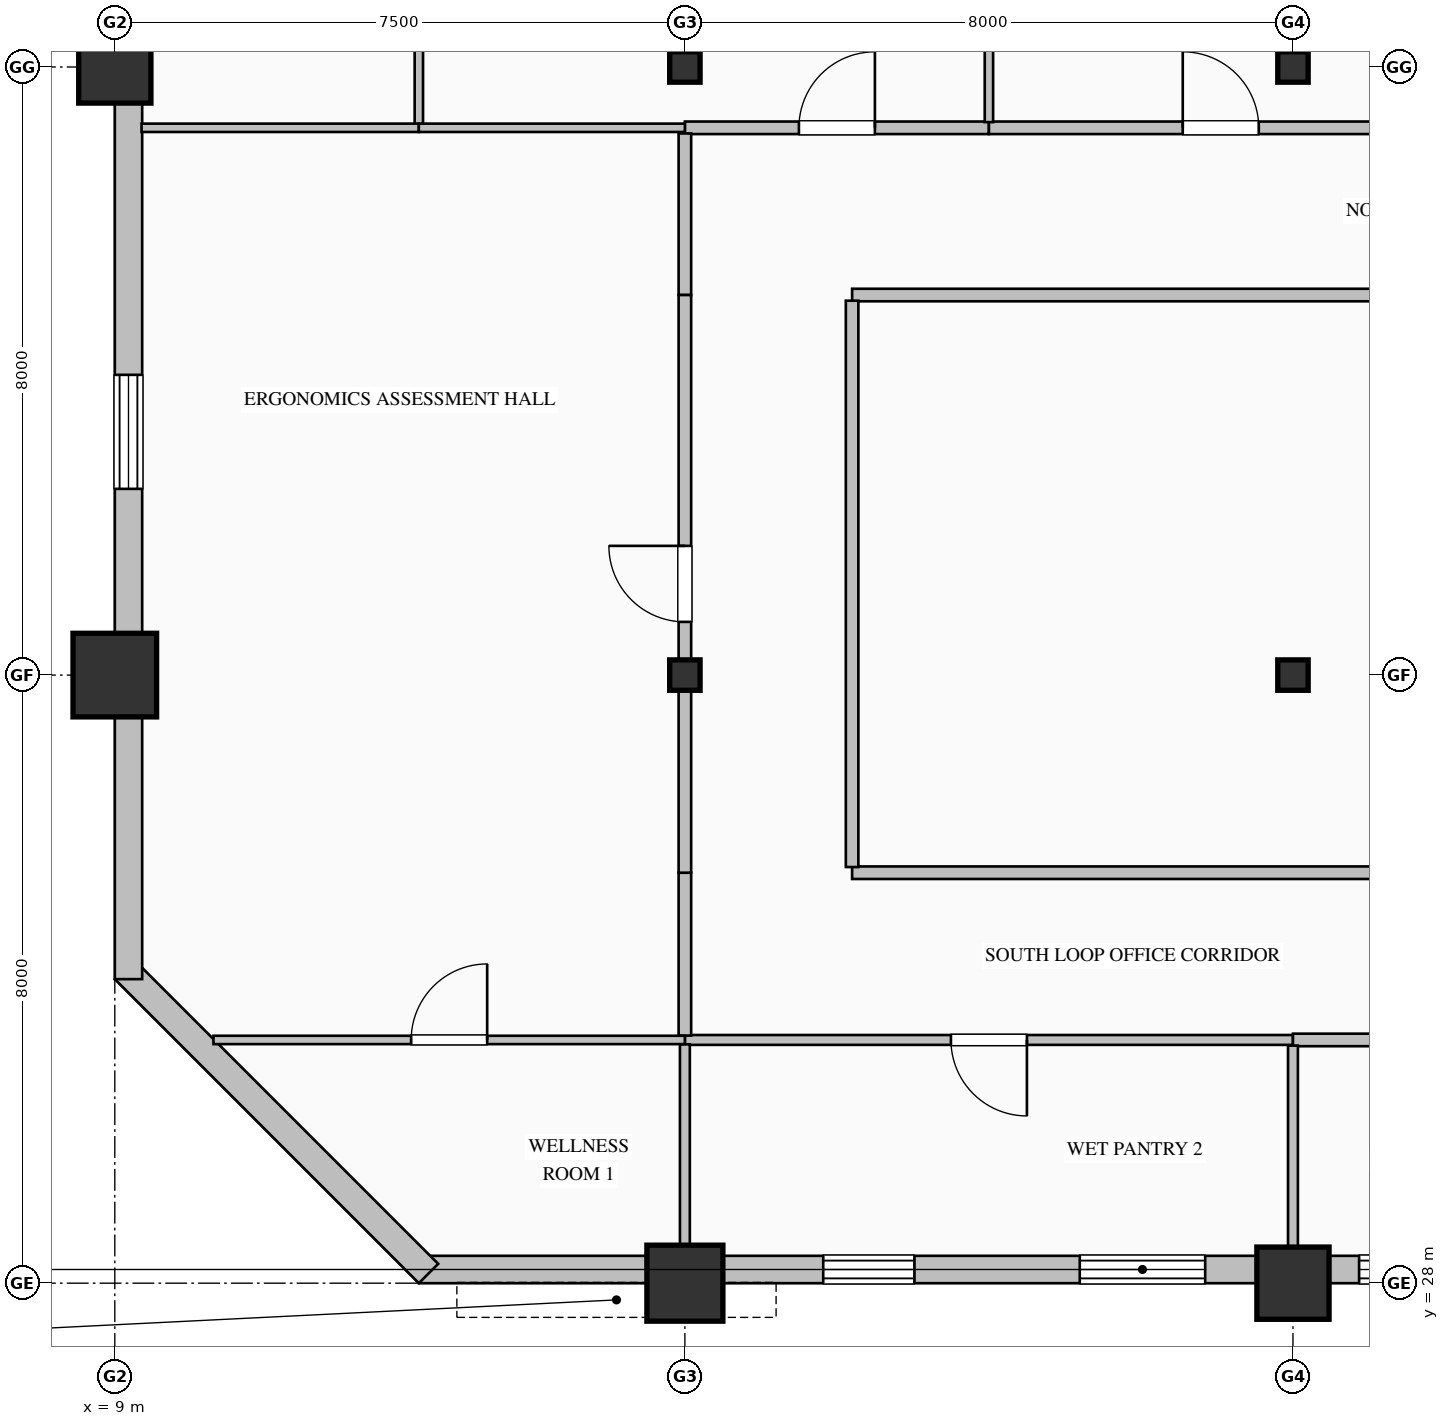
"""IFC4 building model, lengths in metres.
Left out: names, types, materials, properties, quantities, classifications, styles, units other than length and angle.
Written with IfcOpenShell. Run it as: python <this file> out.ifc"""

import sys

from ifc_helpers import new_model, si_unit, direction, frame, frame_2d, origin, origin_2d, place, context, subcontext, project, spatial, rectangle, hollow_rectangle, hollow_circle, i_section, extrude, element, fill, save


model = new_model("IFC4")
c1 = context("Model", 3, precision=1e-05, world=origin(), true_north=direction((0.0, 1.0)))
c2 = subcontext(c1, "Body", "Model", "MODEL_VIEW")
j1 = project(units=[si_unit("LENGTHUNIT", "METRE"), si_unit("PLANEANGLEUNIT", "RADIAN")], contexts=[c1])
p1 = place(None, origin())
s1 = spatial("IfcSite", under=j1, at=p1, CompositionType="ELEMENT")
p2 = place(p1, origin())
s2 = spatial("IfcBuilding", under=s1, at=p2, CompositionType="ELEMENT")
p3 = place(p2, frame((0.0, 0.0, 171.0)))
s3 = spatial("IfcBuildingStorey", under=s2, at=p3, CompositionType="ELEMENT", Elevation=171.0)
p4 = place(p3, frame((9.0, 36.0, 0.0), z_axis=(0.0, 0.0, 1.0), x_axis=(1.0, 0.0, 0.0)))
e1 = element("IfcColumn", 1, at=p4, inside=s3, PredefinedType="COLUMN", context=c2, shape_type="SweptSolid", body=[
    extrude(hollow_rectangle(XDim=1.1, YDim=1.1, WallThickness=0.04, at=origin_2d()), origin(), (0.0, 0.0, 1.0), 4.0),
])
p5 = place(p3, frame((9.0, 44.0, 0.0), z_axis=(0.0, 0.0, 1.0), x_axis=(1.0, 0.0, 0.0)))
e2 = element("IfcColumn", 2, at=p5, inside=s3, PredefinedType="COLUMN", context=c2, shape_type="SweptSolid", body=[
    extrude(hollow_rectangle(XDim=0.95, YDim=0.95, WallThickness=0.036, at=origin_2d()), origin(), (0.0, 0.0, 1.0), 4.0),
])
p6 = place(p3, frame((16.5, 28.0, 0.0), z_axis=(0.0, 0.0, 1.0), x_axis=(1.0, 0.0, 0.0)))
e3 = element("IfcColumn", 3, at=p6, inside=s3, PredefinedType="COLUMN", context=c2, shape_type="SweptSolid", body=[
    extrude(hollow_circle(Radius=0.5, WallThickness=0.036, at=origin_2d()), origin(), (0.0, 0.0, 1.0), 4.0),
])
for number, where, z_axis, x_axis in (
    (4, (16.5, 36.0, 0.0), (0.0, 0.0, 1.0), (1.0, 0.0, 0.0)),
    (5, (16.5, 44.0, 0.0), (0.0, 0.0, 1.0), (1.0, 0.0, 0.0)),
):
    element("IfcColumn", number, at=place(p3, frame(where, z_axis=z_axis, x_axis=x_axis)), inside=s3, PredefinedType="COLUMN", context=c2, shape_type="SweptSolid", body=[
        extrude(i_section(OverallWidth=0.4, OverallDepth=0.4, WebThickness=0.013, FlangeThickness=0.021, FilletRadius=0.022, at=origin_2d()), origin(), (0.0, 0.0, 1.0), 4.0),
    ])
p7 = place(p3, frame((24.5, 28.0, 0.0), z_axis=(0.0, 0.0, 1.0), x_axis=(1.0, 0.0, 0.0)))
e6 = element("IfcColumn", 6, at=p7, inside=s3, PredefinedType="COLUMN", context=c2, shape_type="SweptSolid", body=[
    extrude(hollow_rectangle(XDim=0.95, YDim=0.95, WallThickness=0.036, at=origin_2d()), origin(), (0.0, 0.0, 1.0), 4.0),
])
for number, where, z_axis, x_axis in (
    (7, (24.5, 36.0, 0.0), (0.0, 0.0, 1.0), (1.0, 0.0, 0.0)),
    (8, (24.5, 44.0, 0.0), (0.0, 0.0, 1.0), (1.0, 0.0, 0.0)),
):
    element("IfcColumn", number, at=place(p3, frame(where, z_axis=z_axis, x_axis=x_axis)), inside=s3, PredefinedType="COLUMN", context=c2, shape_type="SweptSolid", body=[
        extrude(i_section(OverallWidth=0.4, OverallDepth=0.4, WebThickness=0.013, FlangeThickness=0.021, FilletRadius=0.022, at=origin_2d()), origin(), (0.0, 0.0, 1.0), 4.0),
    ])
p8 = place(p3, frame((40.52, 28.18, 0.0), z_axis=(0.0, 0.0, 1.0), x_axis=(-1.0, 0.0, 0.0)))
e9 = element("IfcWall", 9, at=p8, inside=s3, PredefinedType="SOLIDWALL", context=c2, shape_type="SweptSolid", body=[
    extrude(rectangle(XDim=27.52, YDim=0.36, at=frame_2d((13.76, 0.0))), origin(), (0.0, 0.0, 1.0), 3.165),
])
p9 = place(p8, frame((10.2, 0.0, 0.7)))
e10 = element("IfcOpeningElement", 10, at=p9, cuts=e9, PredefinedType="OPENING", context=c2, shape_type="SweptSolid", body=[
    extrude(rectangle(XDim=1.2, YDim=1.85, at=frame_2d((0.6, 0.925))), frame((0.0, 0.19, 0.0), z_axis=(0.0, -1.0, 0.0), x_axis=(1.0, 0.0, 0.0)), (0.0, 0.0, 1.0), 0.38),
])
p10 = place(p8, frame((13.65, 0.0, 0.85)))
e11 = element("IfcOpeningElement", 11, at=p10, cuts=e9, PredefinedType="OPENING", context=c2, shape_type="SweptSolid", body=[
    extrude(rectangle(XDim=1.5, YDim=1.95, at=frame_2d((0.75, 0.975))), frame((0.0, 0.19, 0.0), z_axis=(0.0, -1.0, 0.0), x_axis=(1.0, 0.0, 0.0)), (0.0, 0.0, 1.0), 0.38),
])
p11 = place(p8, frame((17.175, 0.0, 0.85)))
e12 = element("IfcOpeningElement", 12, at=p11, cuts=e9, PredefinedType="OPENING", context=c2, shape_type="SweptSolid", body=[
    extrude(rectangle(XDim=1.65, YDim=1.95, at=frame_2d((0.825, 0.975))), frame((0.0, 0.19, 0.0), z_axis=(0.0, -1.0, 0.0), x_axis=(1.0, 0.0, 0.0)), (0.0, 0.0, 1.0), 0.38),
])
p12 = place(p8, frame((21.0, 0.0, 0.7)))
e13 = element("IfcOpeningElement", 13, at=p12, cuts=e9, PredefinedType="OPENING", context=c2, shape_type="SweptSolid", body=[
    extrude(rectangle(XDim=1.2, YDim=1.85, at=frame_2d((0.6, 0.925))), frame((0.0, 0.19, 0.0), z_axis=(0.0, -1.0, 0.0), x_axis=(1.0, 0.0, 0.0)), (0.0, 0.0, 1.0), 0.38),
])
p13 = place(p3, frame((13.127, 28.127, 0.0), z_axis=(0.0, 0.0, 1.0), x_axis=(-0.707106781187, 0.707106781187, 0.0)))
e14 = element("IfcWall", 14, at=p13, inside=s3, PredefinedType="SOLIDWALL", context=c2, shape_type="SweptSolid", body=[
    extrude(rectangle(XDim=5.657, YDim=0.36, at=frame_2d((2.828, 0.0))), origin(), (0.0, 0.0, 1.0), 3.765),
])
p14 = place(p3, frame((9.18, 32.0, 0.0), z_axis=(0.0, 0.0, 1.0), x_axis=(0.0, 1.0, 0.0)))
e15 = element("IfcWall", 15, at=p14, inside=s3, PredefinedType="SOLIDWALL", context=c2, shape_type="SweptSolid", body=[
    extrude(rectangle(XDim=16.0, YDim=0.36, at=frame_2d((8.0, 0.0))), origin(), (0.0, 0.0, 1.0), 3.265),
])
p15 = place(p14, frame((6.45, 0.0, 0.85)))
e16 = element("IfcOpeningElement", 16, at=p15, cuts=e15, PredefinedType="OPENING", context=c2, shape_type="SweptSolid", body=[
    extrude(rectangle(XDim=1.5, YDim=1.95, at=frame_2d((0.75, 0.975))), frame((0.0, 0.19, 0.0), z_axis=(0.0, -1.0, 0.0), x_axis=(1.0, 0.0, 0.0)), (0.0, 0.0, 1.0), 0.38),
])
p16 = place(p3, frame((18.7, 33.4, 0.0), z_axis=(0.0, 0.0, 1.0), x_axis=(1.0, 0.0, 0.0)))
e17 = element("IfcWall", 17, at=p16, inside=s3, PredefinedType="PARTITIONING", context=c2, shape_type="SweptSolid", body=[
    extrude(rectangle(XDim=19.1, YDim=0.165, at=frame_2d((9.55, 0.0))), origin(), (0.0, 0.0, 1.0), 3.765),
])
p17 = place(p16, frame((9.05, 0.0, 0.0)))
e18 = element("IfcOpeningElement", 18, at=p17, cuts=e17, PredefinedType="OPENING", context=c2, shape_type="SweptSolid", body=[
    extrude(rectangle(XDim=1.0, YDim=2.15, at=frame_2d((0.5, 1.075))), frame((0.0, 0.093, 0.0), z_axis=(0.0, -1.0, 0.0), x_axis=(1.0, 0.0, 0.0)), (0.0, 0.0, 1.0), 0.185),
])
p18 = place(p3, frame((24.5, 31.2, 0.0), z_axis=(0.0, 0.0, 1.0), x_axis=(-1.0, 0.0, 0.0)))
e19 = element("IfcWall", 19, at=p18, inside=s3, PredefinedType="PARTITIONING", context=c2, shape_type="SweptSolid", body=[
    extrude(rectangle(XDim=8.0, YDim=0.13, at=frame_2d((4.0, 0.0))), origin(), (0.0, 0.0, 1.0), 3.765),
])
p19 = place(p18, frame((3.5, 0.0, 0.0)))
e20 = element("IfcOpeningElement", 20, at=p19, cuts=e19, PredefinedType="OPENING", context=c2, shape_type="SweptSolid", body=[
    extrude(rectangle(XDim=1.0, YDim=2.15, at=frame_2d((0.5, 1.075))), frame((0.0, 0.075, 0.0), z_axis=(0.0, -1.0, 0.0), x_axis=(1.0, 0.0, 0.0)), (0.0, 0.0, 1.0), 0.15),
])
p20 = place(p3, frame((32.5, 31.2, 0.0), z_axis=(0.0, 0.0, 1.0), x_axis=(-1.0, 0.0, 0.0)))
e21 = element("IfcWall", 21, at=p20, inside=s3, PredefinedType="PARTITIONING", context=c2, shape_type="SweptSolid", body=[
    extrude(rectangle(XDim=8.0, YDim=0.165, at=frame_2d((4.0, 0.0))), origin(), (0.0, 0.0, 1.0), 3.765),
])
p21 = place(p20, frame((3.5, 0.0, 0.0)))
e22 = element("IfcOpeningElement", 22, at=p21, cuts=e21, PredefinedType="OPENING", context=c2, shape_type="SweptSolid", body=[
    extrude(rectangle(XDim=1.0, YDim=2.15, at=frame_2d((0.5, 1.075))), frame((0.0, 0.093, 0.0), z_axis=(0.0, -1.0, 0.0), x_axis=(1.0, 0.0, 0.0)), (0.0, 0.0, 1.0), 0.185),
])
p22 = place(p3, frame((16.5, 31.257, 0.0), z_axis=(0.0, 0.0, 1.0), x_axis=(0.0, 1.0, 0.0)))
e23 = element("IfcWall", 23, at=p22, inside=s3, PredefinedType="PARTITIONING", context=c2, shape_type="SweptSolid", body=[
    extrude(rectangle(XDim=2.143, YDim=0.165, at=frame_2d((1.071, 0.0))), origin(), (0.0, 0.0, 1.0), 3.157),
])
p23 = place(p3, frame((16.5, 43.2, 0.0), z_axis=(0.0, 0.0, 1.0), x_axis=(1.0, 0.0, 0.0)))
e24 = element("IfcWall", 24, at=p23, inside=s3, PredefinedType="PARTITIONING", context=c2, shape_type="SweptSolid", body=[
    extrude(rectangle(XDim=4.0, YDim=0.165, at=frame_2d((2.0, 0.0))), origin(), (0.0, 0.0, 1.0), 3.765),
])
p24 = place(p23, frame((1.5, 0.0, 0.0)))
e25 = element("IfcOpeningElement", 25, at=p24, cuts=e24, PredefinedType="OPENING", context=c2, shape_type="SweptSolid", body=[
    extrude(rectangle(XDim=1.0, YDim=2.15, at=frame_2d((0.5, 1.075))), frame((0.0, 0.093, 0.0), z_axis=(0.0, -1.0, 0.0), x_axis=(1.0, 0.0, 0.0)), (0.0, 0.0, 1.0), 0.185),
])
p25 = place(p3, frame((20.5, 43.2, 0.0), z_axis=(0.0, 0.0, 1.0), x_axis=(1.0, 0.0, 0.0)))
e26 = element("IfcWall", 26, at=p25, inside=s3, PredefinedType="PARTITIONING", context=c2, shape_type="SweptSolid", body=[
    extrude(rectangle(XDim=7.0, YDim=0.165, at=frame_2d((3.5, 0.0))), origin(), (0.0, 0.0, 1.0), 3.765),
])
p26 = place(p25, frame((2.55, 0.0, 0.0)))
e27 = element("IfcOpeningElement", 27, at=p26, cuts=e26, PredefinedType="OPENING", context=c2, shape_type="SweptSolid", body=[
    extrude(rectangle(XDim=1.0, YDim=2.15, at=frame_2d((0.5, 1.075))), frame((0.0, 0.093, 0.0), z_axis=(0.0, -1.0, 0.0), x_axis=(1.0, 0.0, 0.0)), (0.0, 0.0, 1.0), 0.185),
])
p27 = place(p3, frame((37.8, 41.0, 0.0), z_axis=(0.0, 0.0, 1.0), x_axis=(-1.0, 0.0, 0.0)))
e28 = element("IfcWall", 28, at=p27, inside=s3, PredefinedType="PARTITIONING", context=c2, shape_type="SweptSolid", body=[
    extrude(rectangle(XDim=19.1, YDim=0.165, at=frame_2d((9.55, 0.0))), origin(), (0.0, 0.0, 1.0), 3.765),
])
p28 = place(p3, frame((16.5, 41.0, 0.0), z_axis=(0.0, 0.0, 1.0), x_axis=(0.0, 1.0, 0.0)))
e29 = element("IfcWall", 29, at=p28, inside=s3, PredefinedType="PARTITIONING", context=c2, shape_type="SweptSolid", body=[
    extrude(rectangle(XDim=2.125, YDim=0.165, at=frame_2d((1.063, 0.0))), origin(), (0.0, 0.0, 1.0), 3.157),
])
p29 = place(p3, frame((18.7, 40.926, 0.0), z_axis=(0.0, 0.0, 1.0), x_axis=(0.0, -1.0, 0.0)))
e30 = element("IfcWall", 30, at=p29, inside=s3, PredefinedType="PARTITIONING", context=c2, shape_type="SweptSolid", body=[
    extrude(rectangle(XDim=7.451, YDim=0.165, at=frame_2d((3.726, 0.0))), origin(), (0.0, 0.0, 1.0), 3.765),
])
p30 = place(p3, frame((16.5, 33.4, 0.0), z_axis=(0.0, 0.0, 1.0), x_axis=(0.0, 1.0, 0.0)))
e31 = element("IfcWall", 31, at=p30, inside=s3, PredefinedType="PARTITIONING", context=c2, shape_type="SweptSolid", body=[
    extrude(rectangle(XDim=7.6, YDim=0.165, at=frame_2d((3.8, 0.0))), origin(), (0.0, 0.0, 1.0), 3.157),
])
p31 = place(p30, frame((3.3, 0.0, 0.0)))
e32 = element("IfcOpeningElement", 32, at=p31, cuts=e31, PredefinedType="OPENING", context=c2, shape_type="SweptSolid", body=[
    extrude(rectangle(XDim=1.0, YDim=2.15, at=frame_2d((0.5, 1.075))), frame((0.0, 0.093, 0.0), z_axis=(0.0, -1.0, 0.0), x_axis=(1.0, 0.0, 0.0)), (0.0, 0.0, 1.0), 0.185),
])
p32 = place(p3, frame((13.0, 51.502, 0.0), z_axis=(0.0, 0.0, 1.0), x_axis=(0.0, -1.0, 0.0)))
e33 = element("IfcWall", 33, at=p32, inside=s3, PredefinedType="MOVABLE", context=c2, shape_type="SweptSolid", body=[
    extrude(rectangle(XDim=8.255, YDim=0.11, at=frame_2d((4.127, 0.0))), origin(), (0.0, 0.0, 1.0), 3.765),
])
p33 = place(p32, frame((3.628, 0.0, 0.0)))
e34 = element("IfcOpeningElement", 34, at=p33, cuts=e33, PredefinedType="OPENING", context=c2, shape_type="SweptSolid", body=[
    extrude(rectangle(XDim=1.0, YDim=2.15, at=frame_2d((0.5, 1.075))), frame((0.0, 0.065, 0.0), z_axis=(0.0, -1.0, 0.0), x_axis=(1.0, 0.0, 0.0)), (0.0, 0.0, 1.0), 0.13),
])
p34 = place(p3, frame((13.0, 43.2, 0.0), z_axis=(0.0, 0.0, 1.0), x_axis=(-1.0, 0.0, 0.0)))
e35 = element("IfcWall", 35, at=p34, inside=s3, PredefinedType="MOVABLE", context=c2, shape_type="SweptSolid", body=[
    extrude(rectangle(XDim=3.648, YDim=0.11, at=frame_2d((1.824, 0.0))), origin(), (0.0, 0.0, 1.0), 3.765),
])
p35 = place(p3, frame((20.5, 51.648, 0.0), z_axis=(0.0, 0.0, 1.0), x_axis=(0.0, -1.0, 0.0)))
e36 = element("IfcWall", 36, at=p35, inside=s3, PredefinedType="MOVABLE", context=c2, shape_type="SweptSolid", body=[
    extrude(rectangle(XDim=8.374, YDim=0.11, at=frame_2d((4.187, 0.0))), origin(), (0.0, 0.0, 1.0), 3.765),
])
p36 = place(p3, frame((16.5, 43.2, 0.0), z_axis=(0.0, 0.0, 1.0), x_axis=(-1.0, 0.0, 0.0)))
e37 = element("IfcWall", 37, at=p36, inside=s3, PredefinedType="MOVABLE", context=c2, shape_type="SweptSolid", body=[
    extrude(rectangle(XDim=3.5, YDim=0.11, at=frame_2d((1.75, 0.0))), origin(), (0.0, 0.0, 1.0), 3.765),
])
p37 = place(p3, frame((16.5, 31.143, 0.0), z_axis=(0.0, 0.0, 1.0), x_axis=(0.0, -1.0, 0.0)))
e38 = element("IfcWall", 38, at=p37, inside=s3, PredefinedType="PARTITIONING", context=c2, shape_type="SweptSolid", body=[
    extrude(rectangle(XDim=2.791, YDim=0.13, at=frame_2d((1.396, 0.0))), origin(), (0.0, 0.0, 1.0), 3.157),
])
p38 = place(p3, frame((10.298, 31.2, 0.0), z_axis=(0.0, 0.0, 1.0), x_axis=(1.0, 0.0, 0.0)))
e39 = element("IfcWall", 39, at=p38, inside=s3, PredefinedType="MOVABLE", context=c2, shape_type="SweptSolid", body=[
    extrude(rectangle(XDim=6.202, YDim=0.11, at=frame_2d((3.101, 0.0))), origin(), (0.0, 0.0, 1.0), 3.765),
])
p39 = place(p38, frame((2.601, 0.0, 0.0)))
e40 = element("IfcOpeningElement", 40, at=p39, cuts=e39, PredefinedType="OPENING", context=c2, shape_type="SweptSolid", body=[
    extrude(rectangle(XDim=1.0, YDim=2.15, at=frame_2d((0.5, 1.075))), frame((0.0, 0.065, 0.0), z_axis=(0.0, -1.0, 0.0), x_axis=(1.0, 0.0, 0.0)), (0.0, 0.0, 1.0), 0.13),
])
p40 = place(p3, frame((24.5, 31.125, 0.0), z_axis=(0.0, 0.0, 1.0), x_axis=(0.0, -1.0, 0.0)))
e41 = element("IfcWall", 41, at=p40, inside=s3, PredefinedType="PARTITIONING", context=c2, shape_type="SweptSolid", body=[
    extrude(rectangle(XDim=2.773, YDim=0.13, at=frame_2d((1.387, 0.0))), origin(), (0.0, 0.0, 1.0), 3.157),
])
p41 = place(p10, origin())
e42 = element("IfcWindow", 42, at=p41, inside=s3, PartitioningType="DOUBLE_PANEL_VERTICAL", PredefinedType="WINDOW", context=c2, shape_type="SweptSolid", body=[
    extrude(rectangle(XDim=1.5, YDim=1.95, at=frame_2d((0.75, 0.975))), frame((0.0, 0.15, 0.0), z_axis=(0.0, -1.0, 0.0), x_axis=(1.0, 0.0, 0.0)), (0.0, 0.0, 1.0), 0.06),
])
fill(e11, e42)
p42 = place(p11, origin())
e43 = element("IfcWindow", 43, at=p42, inside=s3, PartitioningType="DOUBLE_PANEL_VERTICAL", PredefinedType="WINDOW", context=c2, shape_type="SweptSolid", body=[
    extrude(rectangle(XDim=1.65, YDim=1.95, at=frame_2d((0.825, 0.975))), frame((0.0, 0.15, 0.0), z_axis=(0.0, -1.0, 0.0), x_axis=(1.0, 0.0, 0.0)), (0.0, 0.0, 1.0), 0.06),
])
fill(e12, e43)
p43 = place(p12, origin())
e44 = element("IfcWindow", 44, at=p43, inside=s3, PartitioningType="DOUBLE_PANEL_VERTICAL", PredefinedType="WINDOW", context=c2, shape_type="SweptSolid", body=[
    extrude(rectangle(XDim=1.2, YDim=1.85, at=frame_2d((0.6, 0.925))), frame((0.0, 0.15, 0.0), z_axis=(0.0, -1.0, 0.0), x_axis=(1.0, 0.0, 0.0)), (0.0, 0.0, 1.0), 0.06),
])
fill(e13, e44)
p44 = place(p15, origin())
e45 = element("IfcWindow", 45, at=p44, inside=s3, PartitioningType="DOUBLE_PANEL_VERTICAL", PredefinedType="WINDOW", context=c2, shape_type="SweptSolid", body=[
    extrude(rectangle(XDim=1.5, YDim=1.95, at=frame_2d((0.75, 0.975))), frame((0.0, 0.15, 0.0), z_axis=(0.0, -1.0, 0.0), x_axis=(1.0, 0.0, 0.0)), (0.0, 0.0, 1.0), 0.06),
])
fill(e16, e45)
p45 = place(p24, origin())
e46 = element("IfcDoor", 46, at=p45, inside=s3, OperationType="SINGLE_SWING_RIGHT", PredefinedType="DOOR", context=c2, shape_type="SweptSolid", body=[
    extrude(rectangle(XDim=1.0, YDim=2.15, at=frame_2d((0.5, 1.075))), frame((0.0, 0.025, 0.0), z_axis=(0.0, -1.0, 0.0), x_axis=(1.0, 0.0, 0.0)), (0.0, 0.0, 1.0), 0.05),
])
fill(e25, e46)
p46 = place(p26, origin())
e47 = element("IfcDoor", 47, at=p46, inside=s3, OperationType="SINGLE_SWING_LEFT", PredefinedType="DOOR", context=c2, shape_type="SweptSolid", body=[
    extrude(rectangle(XDim=1.0, YDim=2.15, at=frame_2d((0.5, 1.075))), frame((0.0, 0.025, 0.0), z_axis=(0.0, -1.0, 0.0), x_axis=(1.0, 0.0, 0.0)), (0.0, 0.0, 1.0), 0.05),
])
fill(e27, e47)
p47 = place(p39, origin())
e48 = element("IfcDoor", 48, at=p47, inside=s3, OperationType="SINGLE_SWING_RIGHT", PredefinedType="DOOR", context=c2, shape_type="SweptSolid", body=[
    extrude(rectangle(XDim=1.0, YDim=2.15, at=frame_2d((0.5, 1.075))), frame((0.0, 0.025, 0.0), z_axis=(0.0, -1.0, 0.0), x_axis=(1.0, 0.0, 0.0)), (0.0, 0.0, 1.0), 0.05),
])
fill(e40, e48)
p48 = place(p19, origin())
e49 = element("IfcDoor", 49, at=p48, inside=s3, OperationType="SINGLE_SWING_LEFT", PredefinedType="DOOR", context=c2, shape_type="SweptSolid", body=[
    extrude(rectangle(XDim=1.0, YDim=2.15, at=frame_2d((0.5, 1.075))), frame((0.0, 0.025, 0.0), z_axis=(0.0, -1.0, 0.0), x_axis=(1.0, 0.0, 0.0)), (0.0, 0.0, 1.0), 0.05),
])
fill(e20, e49)
p49 = place(p31, origin())
e50 = element("IfcDoor", 50, at=p49, inside=s3, OperationType="SINGLE_SWING_RIGHT", PredefinedType="DOOR", context=c2, shape_type="SweptSolid", body=[
    extrude(rectangle(XDim=1.0, YDim=2.15, at=frame_2d((0.5, 1.075))), frame((0.0, 0.025, 0.0), z_axis=(0.0, -1.0, 0.0), x_axis=(1.0, 0.0, 0.0)), (0.0, 0.0, 1.0), 0.05),
])
fill(e32, e50)
save(model, sys.argv[1])
